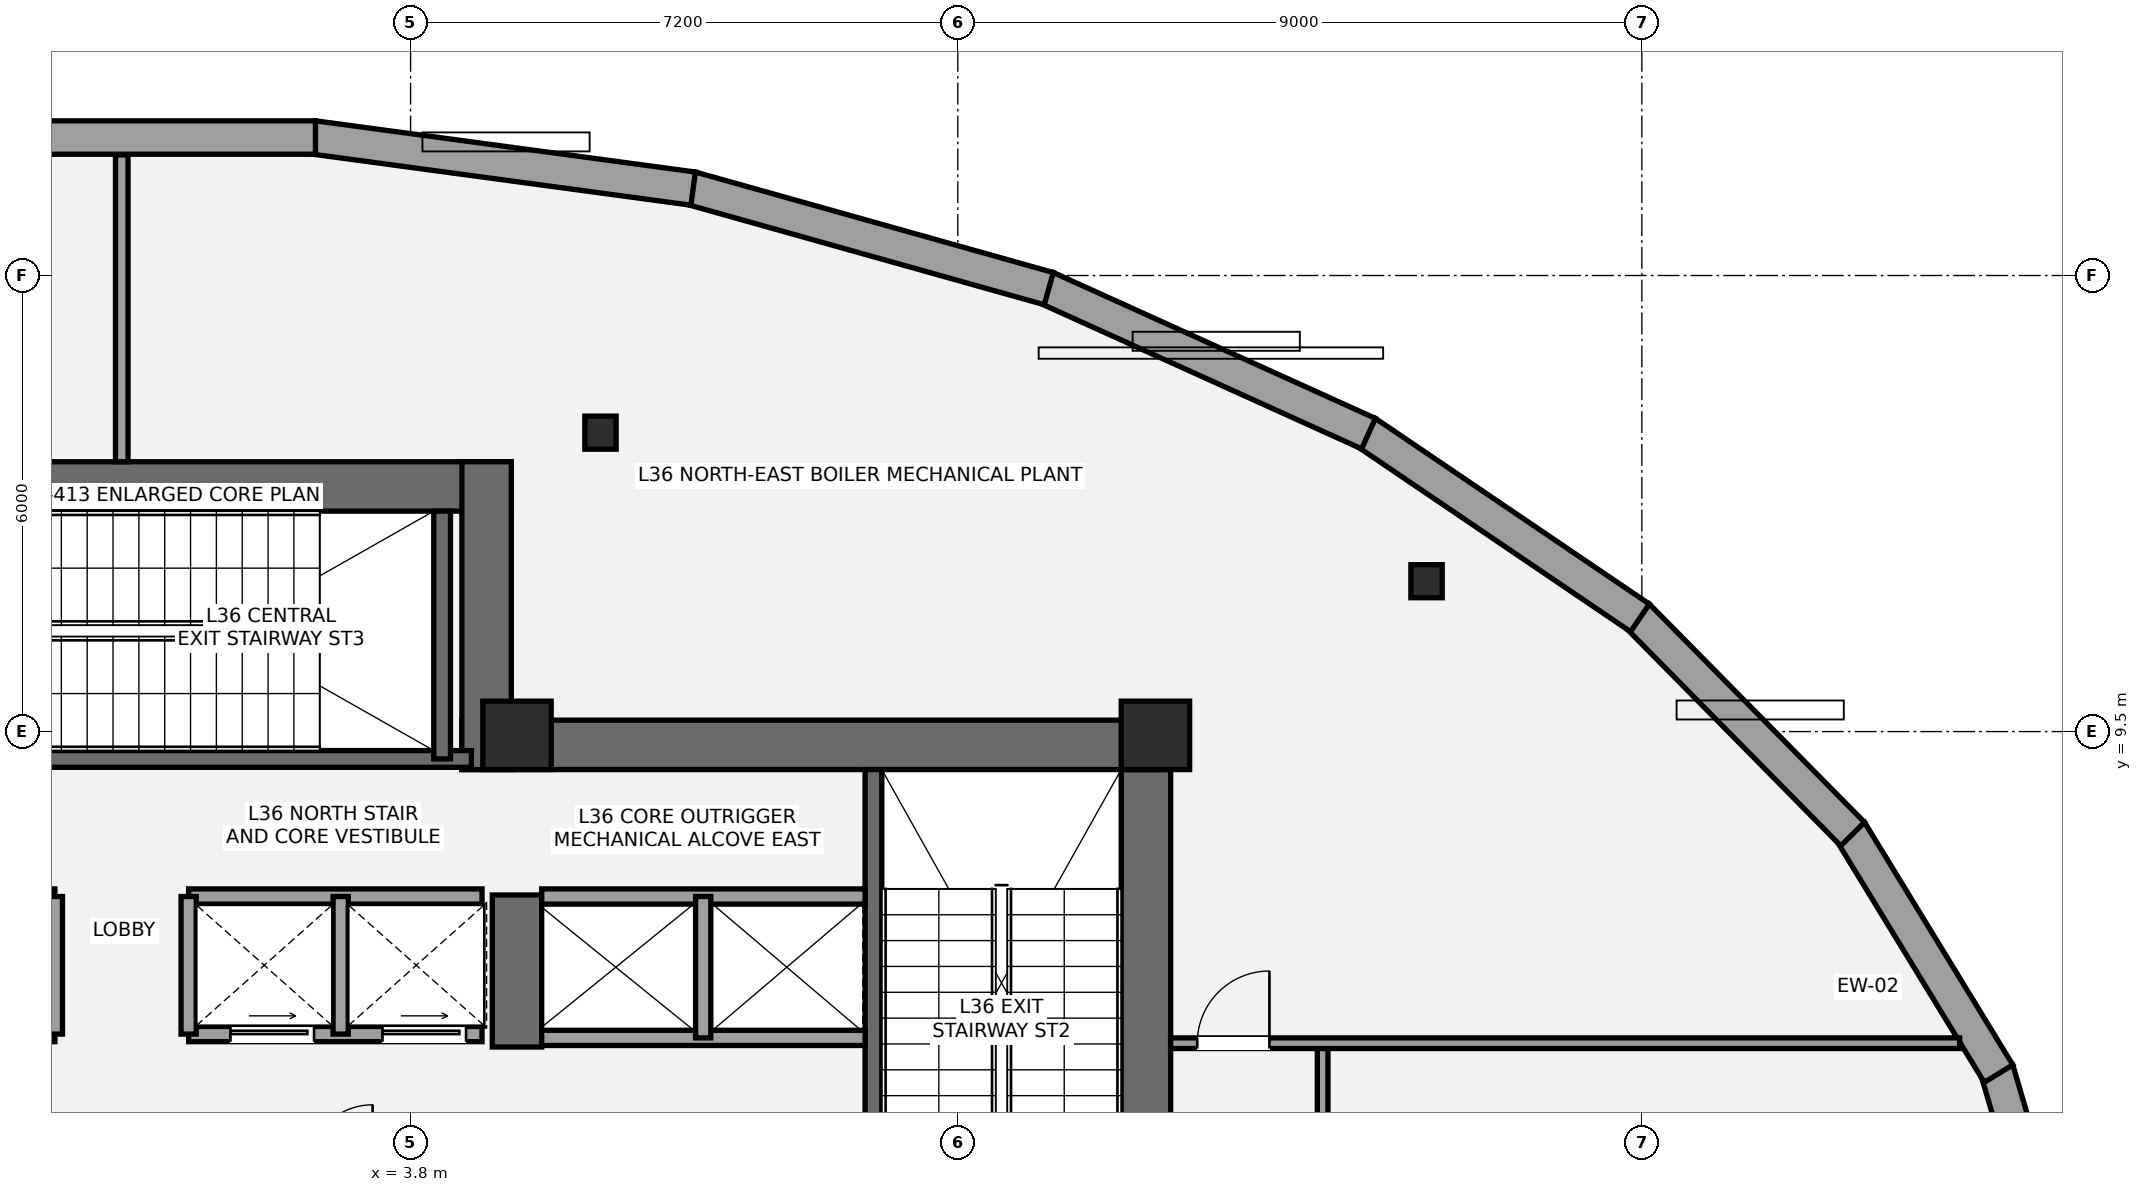
"""IFC4 building model, lengths in metres.
Left out: names, types, materials, properties, quantities, classifications, styles, units other than length and angle.
Written with IfcOpenShell. Run it as: python <this file> out.ifc"""

import sys

from ifc_helpers import new_model, si_unit, direction, frame, frame_2d, origin, origin_2d, place, context, subcontext, project, spatial, rectangle, i_section, extrude, element, fill, save


model = new_model("IFC4")
c1 = context("Model", 3, precision=1e-05, world=origin(), true_north=direction((0.0, 1.0)))
c2 = subcontext(c1, "Body", "Model", "MODEL_VIEW")
j1 = project(units=[si_unit("LENGTHUNIT", "METRE"), si_unit("PLANEANGLEUNIT", "RADIAN")], contexts=[c1])
p1 = place(None, origin())
s1 = spatial("IfcSite", under=j1, at=p1, CompositionType="ELEMENT")
p2 = place(p1, origin())
s2 = spatial("IfcBuilding", under=s1, at=p2, CompositionType="ELEMENT")
p3 = place(p2, frame((0.0, 0.0, 135.1)))
s3 = spatial("IfcBuildingStorey", under=s2, at=p3, CompositionType="ELEMENT", Elevation=135.1)
p4 = place(p3, frame((13.475, 1.2, 0.0), z_axis=(0.0, 0.0, 1.0), x_axis=(0.0, 1.0, 0.0)))
e1 = element("IfcWall", 1, at=p4, inside=s3, PredefinedType="SHEAR", context=c2, shape_type="SweptSolid", body=[
    extrude(rectangle(XDim=8.45, YDim=0.65, at=frame_2d((4.225, 0.0))), origin(), (0.0, 0.0, 1.0), 4.5),
])
p5 = place(p3, frame((4.475, 9.325, 0.0), z_axis=(0.0, 0.0, 1.0), x_axis=(1.0, 0.0, 0.0)))
e2 = element("IfcWall", 2, at=p5, inside=s3, PredefinedType="SHEAR", context=c2, shape_type="SweptSolid", body=[
    extrude(rectangle(XDim=9.325, YDim=0.65, at=frame_2d((4.663, 0.0))), origin(), (0.0, 0.0, 1.0), 4.5),
])
p6 = place(p3, frame((5.2, 5.35, 0.0), z_axis=(0.0, 0.0, 1.0), x_axis=(0.0, 1.0, 0.0)))
e3 = element("IfcWall", 3, at=p6, inside=s3, PredefinedType="SHEAR", context=c2, shape_type="SweptSolid", body=[
    extrude(rectangle(XDim=2.0, YDim=0.65, at=frame_2d((1.0, 0.0))), origin(), (0.0, 0.0, 1.0), 4.5),
])
p7 = place(p3, frame((9.89, 1.85, 0.0), z_axis=(0.0, 0.0, 1.0), x_axis=(0.0, 1.0, 0.0)))
e4 = element("IfcWall", 4, at=p7, inside=s3, PredefinedType="SHEAR", context=c2, shape_type="SweptSolid", body=[
    extrude(rectangle(XDim=7.15, YDim=0.22, at=frame_2d((3.575, 0.0))), origin(), (0.0, 0.0, 1.0), 4.5),
])
p8 = place(p3, frame((-5.125, 12.725, 0.0), z_axis=(0.0, 0.0, 1.0), x_axis=(1.0, 0.0, 0.0)))
e5 = element("IfcWall", 5, at=p8, inside=s3, PredefinedType="SHEAR", context=c2, shape_type="SweptSolid", body=[
    extrude(rectangle(XDim=10.25, YDim=0.65, at=frame_2d((5.125, 0.0))), origin(), (0.0, 0.0, 1.0), 4.5),
])
p9 = place(p3, frame((4.8, 9.0, 0.0), z_axis=(0.0, 0.0, 1.0), x_axis=(0.0, 1.0, 0.0)))
e6 = element("IfcWall", 6, at=p9, inside=s3, PredefinedType="SHEAR", context=c2, shape_type="SweptSolid", body=[
    extrude(rectangle(XDim=4.05, YDim=0.65, at=frame_2d((2.025, 0.0))), origin(), (0.0, 0.0, 1.0), 4.5),
])
p10 = place(p3, frame((-4.7, 9.14, 0.0), z_axis=(0.0, 0.0, 1.0), x_axis=(1.0, 0.0, 0.0)))
e7 = element("IfcWall", 7, at=p10, inside=s3, PredefinedType="SHEAR", context=c2, shape_type="SweptSolid", body=[
    extrude(rectangle(XDim=9.3, YDim=0.22, at=frame_2d((4.65, 0.0))), origin(), (0.0, 0.0, 1.0), 4.5),
])
p11 = place(p10, frame((2.23, 0.0, 0.0)))
e8 = element("IfcOpeningElement", 8, at=p11, cuts=e7, PredefinedType="OPENING", context=c2, shape_type="SweptSolid", body=[
    extrude(rectangle(XDim=1.05, YDim=2.15, at=frame_2d((0.525, 1.075))), frame((0.0, 0.12, 0.0), z_axis=(0.0, -1.0, 0.0), x_axis=(1.0, 0.0, 0.0)), (0.0, 0.0, 1.0), 0.24),
])
p12 = place(p3, frame((4.215, 9.14, 0.0), z_axis=(0.0, 0.0, 1.0), x_axis=(0.0, 1.0, 0.0)))
e9 = element("IfcWall", 9, at=p12, inside=s3, PredefinedType="SHEAR", context=c2, shape_type="SweptSolid", body=[
    extrude(rectangle(XDim=3.26, YDim=0.22, at=frame_2d((1.63, 0.0))), origin(), (0.0, 0.0, 1.0), 4.5),
])
for number, where, z_axis, x_axis in (
    (10, (5.2, 9.45, 0.0), (0.0, 0.0, 1.0), (1.0, 0.0, 0.0)),
    (11, (13.6, 9.45, 0.0), (0.0, 0.0, 1.0), (1.0, 0.0, 0.0)),
):
    element("IfcColumn", number, at=place(p3, frame(where, z_axis=z_axis, x_axis=x_axis)), inside=s3, PredefinedType="COLUMN", context=c2, shape_type="SweptSolid", body=[
        extrude(rectangle(XDim=0.9, YDim=0.9, at=origin_2d()), origin(), (0.0, 0.0, 1.0), 4.5),
    ])
for number, where, z_axis, x_axis in (
    (12, (17.167, 11.478, 0.0), (0.0, 0.0, 1.0), (1.0, 0.0, 0.0)),
    (13, (6.299, 13.433, 0.0), (0.0, 0.0, 1.0), (1.0, 0.0, 0.0)),
):
    element("IfcColumn", number, at=place(p3, frame(where, z_axis=z_axis, x_axis=x_axis)), inside=s3, PredefinedType="COLUMN", context=c2, shape_type="SweptSolid", body=[
        extrude(i_section(OverallWidth=0.412, OverallDepth=0.435, WebThickness=0.036, FlangeThickness=0.057, at=origin_2d()), origin(), (0.0, 0.0, 1.0), 4.5),
    ])
p13 = place(p3, frame((24.669, 5.053, 0.0), z_axis=(0.0, 0.0, 1.0), x_axis=(0.28170956188, -0.959499725245, 0.0)))
e14 = element("IfcWall", 14, at=p13, inside=s3, PredefinedType="STANDARD", context=c2, shape_type="SweptSolid", body=[
    extrude(rectangle(XDim=3.531, YDim=0.44, at=frame_2d((1.765, 0.0))), origin(), (0.0, 0.0, 1.0), 3.498),
])
p14 = place(p3, frame((22.742, 8.191, 0.0), z_axis=(0.0, 0.0, 1.0), x_axis=(0.521476412293, -0.853265698022, 0.0)))
e15 = element("IfcWall", 15, at=p14, inside=s3, PredefinedType="STANDARD", context=c2, shape_type="SweptSolid", body=[
    extrude(rectangle(XDim=3.74, YDim=0.44, at=frame_2d((1.87, 0.0))), origin(), (0.0, 0.0, 1.0), 3.498),
])
p15 = place(p3, frame((19.942, 11.023, 0.0), z_axis=(0.0, 0.0, 1.0), x_axis=(0.702094935552, -0.712083352897, 0.0)))
e16 = element("IfcWall", 16, at=p15, inside=s3, PredefinedType="STANDARD", context=c2, shape_type="SweptSolid", body=[
    extrude(rectangle(XDim=4.033, YDim=0.44, at=frame_2d((2.017, 0.0))), origin(), (0.0, 0.0, 1.0), 3.498),
])
p16 = place(p3, frame((16.371, 13.438, 0.0), z_axis=(0.0, 0.0, 1.0), x_axis=(0.827816201219, -0.56099940909, 0.0)))
e17 = element("IfcWall", 17, at=p16, inside=s3, PredefinedType="STANDARD", context=c2, shape_type="SweptSolid", body=[
    extrude(rectangle(XDim=4.354, YDim=0.44, at=frame_2d((2.177, 0.0))), origin(), (0.0, 0.0, 1.0), 3.498),
])
p17 = place(p3, frame((12.166, 15.339, 0.0), z_axis=(0.0, 0.0, 1.0), x_axis=(0.910938924115, -0.412541242221, 0.0)))
e18 = element("IfcWall", 18, at=p17, inside=s3, PredefinedType="STANDARD", context=c2, shape_type="SweptSolid", body=[
    extrude(rectangle(XDim=4.652, YDim=0.44, at=frame_2d((2.326, 0.0))), origin(), (0.0, 0.0, 1.0), 3.498),
])
p18 = place(p3, frame((7.488, 16.649, 0.0), z_axis=(0.0, 0.0, 1.0), x_axis=(0.962790668442, -0.270248272446, 0.0)))
e19 = element("IfcWall", 19, at=p18, inside=s3, PredefinedType="STANDARD", context=c2, shape_type="SweptSolid", body=[
    extrude(rectangle(XDim=4.891, YDim=0.44, at=frame_2d((2.445, 0.0))), origin(), (0.0, 0.0, 1.0), 3.498),
])
p19 = place(p3, frame((2.519, 17.317, 0.0), z_axis=(0.0, 0.0, 1.0), x_axis=(0.99103751038, -0.133583880086, 0.0)))
e20 = element("IfcWall", 20, at=p19, inside=s3, PredefinedType="STANDARD", context=c2, shape_type="SweptSolid", body=[
    extrude(rectangle(XDim=5.044, YDim=0.44, at=frame_2d((2.522, 0.0))), origin(), (0.0, 0.0, 1.0), 3.498),
])
p20 = place(p3, frame((-2.548, 17.315, 0.0), z_axis=(0.0, 0.0, 1.0), x_axis=(1.0, 0.0, 0.0)))
e21 = element("IfcWall", 21, at=p20, inside=s3, PredefinedType="STANDARD", context=c2, shape_type="SweptSolid", body=[
    extrude(rectangle(XDim=5.097, YDim=0.44, at=frame_2d((2.548, 0.0))), origin(), (0.0, 0.0, 1.0), 3.498),
])
for number, where, z_axis, x_axis in (
    (22, (5.525, 5.47, 0.0), (0.0, 0.0, 1.0), (1.0, 0.0, 0.0)),
    (23, (5.525, 7.33, 0.0), (0.0, 0.0, 1.0), (1.0, 0.0, 0.0)),
):
    element("IfcWall", number, at=place(p3, frame(where, z_axis=z_axis, x_axis=x_axis)), inside=s3, PredefinedType="SOLIDWALL", context=c2, shape_type="SweptSolid", body=[
        extrude(rectangle(XDim=4.255, YDim=0.2, at=frame_2d((2.127, 0.0))), origin(), (0.0, 0.0, 1.0), 4.28),
    ])
p21 = place(p3, frame((7.65, 5.47, 0.0), z_axis=(0.0, 0.0, 1.0), x_axis=(0.0, 1.0, 0.0)))
e24 = element("IfcWall", 24, at=p21, inside=s3, PredefinedType="SOLIDWALL", context=c2, shape_type="SweptSolid", body=[
    extrude(rectangle(XDim=1.86, YDim=0.2, at=frame_2d((0.93, 0.0))), origin(), (0.0, 0.0, 1.0), 4.28),
])
p22 = place(p3, frame((-4.74, 5.52, 0.0), z_axis=(0.0, 0.0, 1.0), x_axis=(1.0, 0.0, 0.0)))
e25 = element("IfcWall", 25, at=p22, inside=s3, PredefinedType="SOLIDWALL", context=c2, shape_type="SweptSolid", body=[
    extrude(rectangle(XDim=3.86, YDim=0.2, at=frame_2d((1.93, 0.0))), origin(), (0.0, 0.0, 1.0), 4.28),
])
p23 = place(p22, frame((0.55, 0.0, 0.0)))
e26 = element("IfcOpeningElement", 26, at=p23, cuts=e25, PredefinedType="OPENING", context=c2, shape_type="SweptSolid", body=[
    extrude(rectangle(XDim=1.1, YDim=2.2, at=frame_2d((0.55, 1.1))), frame((0.0, 0.11, 0.0), z_axis=(0.0, -1.0, 0.0), x_axis=(1.0, 0.0, 0.0)), (0.0, 0.0, 1.0), 0.22),
])
p24 = place(p22, frame((2.3, 0.0, 0.0)))
e27 = element("IfcOpeningElement", 27, at=p24, cuts=e25, PredefinedType="OPENING", context=c2, shape_type="SweptSolid", body=[
    extrude(rectangle(XDim=1.1, YDim=2.2, at=frame_2d((0.55, 1.1))), frame((0.0, 0.11, 0.0), z_axis=(0.0, -1.0, 0.0), x_axis=(1.0, 0.0, 0.0)), (0.0, 0.0, 1.0), 0.22),
])
p25 = place(p3, frame((0.88, 5.52, 0.0), z_axis=(0.0, 0.0, 1.0), x_axis=(1.0, 0.0, 0.0)))
e28 = element("IfcWall", 28, at=p25, inside=s3, PredefinedType="SOLIDWALL", context=c2, shape_type="SweptSolid", body=[
    extrude(rectangle(XDim=3.86, YDim=0.2, at=frame_2d((1.93, 0.0))), origin(), (0.0, 0.0, 1.0), 4.28),
])
p26 = place(p25, frame((0.55, 0.0, 0.0)))
e29 = element("IfcOpeningElement", 29, at=p26, cuts=e28, PredefinedType="OPENING", context=c2, shape_type="SweptSolid", body=[
    extrude(rectangle(XDim=1.1, YDim=2.2, at=frame_2d((0.55, 1.1))), frame((0.0, 0.11, 0.0), z_axis=(0.0, -1.0, 0.0), x_axis=(1.0, 0.0, 0.0)), (0.0, 0.0, 1.0), 0.22),
])
p27 = place(p25, frame((2.55, 0.0, 0.0)))
e30 = element("IfcOpeningElement", 30, at=p27, cuts=e28, PredefinedType="OPENING", context=c2, shape_type="SweptSolid", body=[
    extrude(rectangle(XDim=1.1, YDim=2.2, at=frame_2d((0.55, 1.1))), frame((0.0, 0.11, 0.0), z_axis=(0.0, -1.0, 0.0), x_axis=(1.0, 0.0, 0.0)), (0.0, 0.0, 1.0), 0.22),
])
for number, where, z_axis, x_axis in (
    (31, (-4.74, 7.33, 0.0), (0.0, 0.0, 1.0), (1.0, 0.0, 0.0)),
    (32, (0.88, 7.33, 0.0), (0.0, 0.0, 1.0), (1.0, 0.0, 0.0)),
):
    element("IfcWall", number, at=place(p3, frame(where, z_axis=z_axis, x_axis=x_axis)), inside=s3, PredefinedType="SOLIDWALL", context=c2, shape_type="SweptSolid", body=[
        extrude(rectangle(XDim=3.86, YDim=0.2, at=frame_2d((1.93, 0.0))), origin(), (0.0, 0.0, 1.0), 4.28),
    ])
for number, where, z_axis, x_axis in (
    (33, (2.88, 5.52, 0.0), (0.0, 0.0, 1.0), (0.0, 1.0, 0.0)),
    (34, (-0.88, 5.52, 0.0), (0.0, 0.0, 1.0), (0.0, 1.0, 0.0)),
    (35, (0.88, 5.52, 0.0), (0.0, 0.0, 1.0), (0.0, 1.0, 0.0)),
):
    element("IfcWall", number, at=place(p3, frame(where, z_axis=z_axis, x_axis=x_axis)), inside=s3, PredefinedType="SOLIDWALL", context=c2, shape_type="SweptSolid", body=[
        extrude(rectangle(XDim=1.81, YDim=0.2, at=frame_2d((0.905, 0.0))), origin(), (0.0, 0.0, 1.0), 4.28),
    ])
p28 = place(p3, frame((15.8, -5.8, 0.0), z_axis=(0.0, 0.0, 1.0), x_axis=(0.0, 1.0, 0.0)))
e36 = element("IfcWall", 36, at=p28, inside=s3, PredefinedType="PARTITIONING", context=c2, shape_type="SweptSolid", body=[
    extrude(rectangle(XDim=11.2, YDim=0.14, at=frame_2d((5.6, 0.0))), origin(), (0.0, 0.0, 1.0), 2.47),
])
p29 = place(p28, frame((0.35, 0.0, 0.0)))
e37 = element("IfcOpeningElement", 37, at=p29, cuts=e36, PredefinedType="OPENING", context=c2, shape_type="SweptSolid", body=[
    extrude(rectangle(XDim=0.95, YDim=2.15, at=frame_2d((0.475, 1.075))), frame((0.0, 0.08, 0.0), z_axis=(0.0, -1.0, 0.0), x_axis=(1.0, 0.0, 0.0)), (0.0, 0.0, 1.0), 0.16),
])
p30 = place(p28, frame((1.9, 0.0, 0.0)))
e38 = element("IfcOpeningElement", 38, at=p30, cuts=e36, PredefinedType="OPENING", context=c2, shape_type="SweptSolid", body=[
    extrude(rectangle(XDim=0.95, YDim=2.15, at=frame_2d((0.475, 1.075))), frame((0.0, 0.08, 0.0), z_axis=(0.0, -1.0, 0.0), x_axis=(1.0, 0.0, 0.0)), (0.0, 0.0, 1.0), 0.16),
])
p31 = place(p3, frame((13.8, 5.4, 0.0), z_axis=(0.0, 0.0, 1.0), x_axis=(1.0, 0.0, 0.0)))
e39 = element("IfcWall", 39, at=p31, inside=s3, PredefinedType="PARTITIONING", context=c2, shape_type="SweptSolid", body=[
    extrude(rectangle(XDim=10.381, YDim=0.14, at=frame_2d((5.19, 0.0))), origin(), (0.0, 0.0, 1.0), 4.28),
])
p32 = place(p31, frame((0.35, 0.0, 0.0)))
e40 = element("IfcOpeningElement", 40, at=p32, cuts=e39, PredefinedType="OPENING", context=c2, shape_type="SweptSolid", body=[
    extrude(rectangle(XDim=0.95, YDim=2.15, at=frame_2d((0.475, 1.075))), frame((0.0, 0.08, 0.0), z_axis=(0.0, -1.0, 0.0), x_axis=(1.0, 0.0, 0.0)), (0.0, 0.0, 1.0), 0.16),
])
p33 = place(p3, frame((0.0, 13.05, 0.0), z_axis=(0.0, 0.0, 1.0), x_axis=(0.0, 1.0, 0.0)))
e41 = element("IfcWall", 41, at=p33, inside=s3, PredefinedType="PARTITIONING", context=c2, shape_type="SweptSolid", body=[
    extrude(rectangle(XDim=4.037, YDim=0.165, at=frame_2d((2.019, 0.0))), origin(), (0.0, 0.0, 1.0), 4.28),
])
p34 = place(p26, origin())
e42 = element("IfcDoor", 42, at=p34, inside=s3, OperationType="SLIDING_TO_LEFT", PredefinedType="DOOR", context=c2, shape_type="SweptSolid", body=[
    extrude(rectangle(XDim=1.1, YDim=2.2, at=frame_2d((0.55, 1.1))), frame((0.0, 0.025, 0.0), z_axis=(0.0, -1.0, 0.0), x_axis=(1.0, 0.0, 0.0)), (0.0, 0.0, 1.0), 0.05),
])
fill(e29, e42)
p35 = place(p27, origin())
e43 = element("IfcDoor", 43, at=p35, inside=s3, OperationType="SLIDING_TO_LEFT", PredefinedType="DOOR", context=c2, shape_type="SweptSolid", body=[
    extrude(rectangle(XDim=1.1, YDim=2.2, at=frame_2d((0.55, 1.1))), frame((0.0, 0.025, 0.0), z_axis=(0.0, -1.0, 0.0), x_axis=(1.0, 0.0, 0.0)), (0.0, 0.0, 1.0), 0.05),
])
fill(e30, e43)
p36 = place(p32, origin())
e44 = element("IfcDoor", 44, at=p36, inside=s3, OperationType="SINGLE_SWING_RIGHT", PredefinedType="DOOR", context=c2, shape_type="SweptSolid", body=[
    extrude(rectangle(XDim=0.95, YDim=2.15, at=frame_2d((0.475, 1.075))), frame((0.0, 0.025, 0.0), z_axis=(0.0, -1.0, 0.0), x_axis=(1.0, 0.0, 0.0)), (0.0, 0.0, 1.0), 0.05),
])
fill(e40, e44)
save(model, sys.argv[1])
